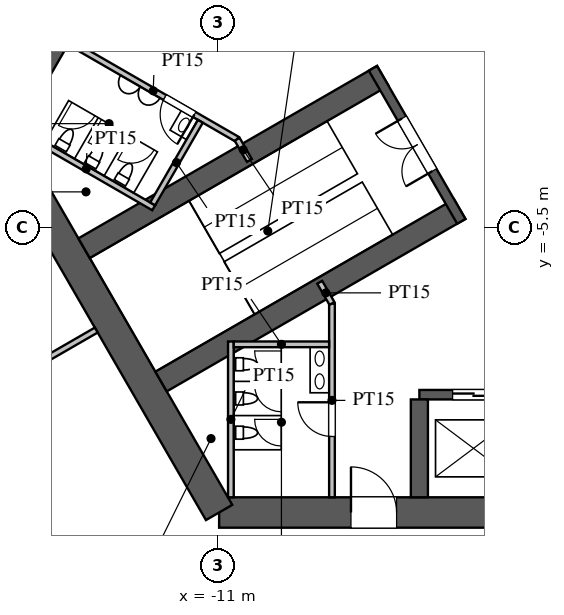
"""IFC4 building model, lengths in metres.
Left out: names, types, materials, properties, quantities, classifications, styles, units other than length and angle.
Written with IfcOpenShell. Run it as: python <this file> out.ifc"""

import sys

from ifc_helpers import new_model, si_unit, direction, frame, frame_2d, origin, place, context, subcontext, project, spatial, rectangle, extrude, element, fill, save


model = new_model("IFC4")
c1 = context("Model", 3, precision=1e-05, world=origin(), true_north=direction((0.0, 1.0)))
c2 = subcontext(c1, "Body", "Model", "MODEL_VIEW")
j1 = project(units=[si_unit("LENGTHUNIT", "METRE"), si_unit("PLANEANGLEUNIT", "RADIAN")], contexts=[c1])
p1 = place(None, origin())
s1 = spatial("IfcSite", under=j1, at=p1, CompositionType="ELEMENT")
p2 = place(p1, origin())
s2 = spatial("IfcBuilding", under=s1, at=p2, CompositionType="ELEMENT")
p3 = place(p2, frame((0.0, 0.0, 98.1)))
s3 = spatial("IfcBuildingStorey", under=s2, at=p3, CompositionType="ELEMENT", Elevation=98.1)
p4 = place(p3, frame((-10.97, -13.0, 0.0), z_axis=(0.0, 0.0, 1.0), x_axis=(1.0, 0.0, 0.0)))
e1 = element("IfcWall", 1, at=p4, inside=s3, PredefinedType="SHEAR", context=c2, shape_type="SweptSolid", body=[
    extrude(rectangle(XDim=21.939, YDim=0.8, at=frame_2d((10.97, 0.0))), origin(), (0.0, 0.0, 1.0), 5.0),
])
p5 = place(p4, frame((17.27, 0.0, 0.0)))
e2 = element("IfcOpeningElement", 2, at=p5, cuts=e1, PredefinedType="OPENING", context=c2, shape_type="SweptSolid", body=[
    extrude(rectangle(XDim=1.2, YDim=2.1, at=frame_2d((0.6, 1.05))), frame((0.0, 0.41, 0.0), z_axis=(0.0, -1.0, 0.0), x_axis=(1.0, 0.0, 0.0)), (0.0, 0.0, 1.0), 0.82),
])
p6 = place(p4, frame((3.47, 0.0, 0.0)))
e3 = element("IfcOpeningElement", 3, at=p6, cuts=e1, PredefinedType="OPENING", context=c2, shape_type="SweptSolid", body=[
    extrude(rectangle(XDim=1.2, YDim=2.1, at=frame_2d((0.6, 1.05))), frame((0.0, 0.41, 0.0), z_axis=(0.0, -1.0, 0.0), x_axis=(1.0, 0.0, 0.0)), (0.0, 0.0, 1.0), 0.82),
])
p7 = place(p3, frame((-5.773, 16.0, 0.0), z_axis=(0.0, 0.0, 1.0), x_axis=(-0.500002442456, -0.866023993627, 0.0)))
e4 = element("IfcWall", 4, at=p7, inside=s3, PredefinedType="SHEAR", context=c2, shape_type="SweptSolid", body=[
    extrude(rectangle(XDim=21.939, YDim=0.8, at=frame_2d((10.97, 0.0))), origin(), (0.0, 0.0, 1.0), 5.0),
])
p8 = place(p7, frame((17.27, 0.0, 0.0)))
e5 = element("IfcOpeningElement", 5, at=p8, cuts=e4, PredefinedType="OPENING", context=c2, shape_type="SweptSolid", body=[
    extrude(rectangle(XDim=1.2, YDim=2.1, at=frame_2d((0.6, 1.05))), frame((0.0, 0.41, 0.0), z_axis=(0.0, -1.0, 0.0), x_axis=(1.0, 0.0, 0.0)), (0.0, 0.0, 1.0), 0.82),
])
p9 = place(p7, frame((3.47, 0.0, 0.0)))
e6 = element("IfcOpeningElement", 6, at=p9, cuts=e4, PredefinedType="OPENING", context=c2, shape_type="SweptSolid", body=[
    extrude(rectangle(XDim=1.2, YDim=2.1, at=frame_2d((0.6, 1.05))), frame((0.0, 0.41, 0.0), z_axis=(0.0, -1.0, 0.0), x_axis=(1.0, 0.0, 0.0)), (0.0, 0.0, 1.0), 0.82),
])
p10 = place(p3, frame((-16.743, -3.0, 0.0), z_axis=(0.0, 0.0, 1.0), x_axis=(0.499995765644, -0.866027848477, 0.0)))
e7 = element("IfcWall", 7, at=p10, inside=s3, PredefinedType="SHEAR", context=c2, shape_type="SweptSolid", body=[
    extrude(rectangle(XDim=11.547, YDim=0.8, at=frame_2d((5.773, 0.0))), origin(), (0.0, 0.0, 1.0), 5.0),
])
p11 = place(p3, frame((-5.7, -9.9, 0.0), z_axis=(0.0, 0.0, 1.0), x_axis=(1.0, 0.0, 0.0)))
e8 = element("IfcWall", 8, at=p11, inside=s3, PredefinedType="SHEAR", context=c2, shape_type="SweptSolid", body=[
    extrude(rectangle(XDim=11.4, YDim=0.25, at=frame_2d((5.7, 0.0))), origin(), (0.0, 0.0, 1.0), 5.0),
])
p12 = place(p11, frame((0.875, 0.0, 0.0)))
e9 = element("IfcOpeningElement", 9, at=p12, cuts=e8, PredefinedType="OPENING", context=c2, shape_type="SweptSolid", body=[
    extrude(rectangle(XDim=1.1, YDim=2.2, at=frame_2d((0.55, 1.1))), frame((0.0, 0.135, 0.0), z_axis=(0.0, -1.0, 0.0), x_axis=(1.0, 0.0, 0.0)), (0.0, 0.0, 1.0), 0.27),
])
p13 = place(p11, frame((3.725, 0.0, 0.0)))
e10 = element("IfcOpeningElement", 10, at=p13, cuts=e8, PredefinedType="OPENING", context=c2, shape_type="SweptSolid", body=[
    extrude(rectangle(XDim=1.1, YDim=2.2, at=frame_2d((0.55, 1.1))), frame((0.0, 0.135, 0.0), z_axis=(0.0, -1.0, 0.0), x_axis=(1.0, 0.0, 0.0)), (0.0, 0.0, 1.0), 0.27),
])
p14 = place(p11, frame((6.575, 0.0, 0.0)))
e11 = element("IfcOpeningElement", 11, at=p14, cuts=e8, PredefinedType="OPENING", context=c2, shape_type="SweptSolid", body=[
    extrude(rectangle(XDim=1.1, YDim=2.2, at=frame_2d((0.55, 1.1))), frame((0.0, 0.135, 0.0), z_axis=(0.0, -1.0, 0.0), x_axis=(1.0, 0.0, 0.0)), (0.0, 0.0, 1.0), 0.27),
])
p15 = place(p11, frame((9.425, 0.0, 0.0)))
e12 = element("IfcOpeningElement", 12, at=p15, cuts=e8, PredefinedType="OPENING", context=c2, shape_type="SweptSolid", body=[
    extrude(rectangle(XDim=1.1, YDim=2.2, at=frame_2d((0.55, 1.1))), frame((0.0, 0.135, 0.0), z_axis=(0.0, -1.0, 0.0), x_axis=(1.0, 0.0, 0.0)), (0.0, 0.0, 1.0), 0.27),
])
p16 = place(p3, frame((-5.7, -10.025, 0.0), z_axis=(0.0, 0.0, 1.0), x_axis=(0.0, -1.0, 0.0)))
e13 = element("IfcWall", 13, at=p16, inside=s3, PredefinedType="SHEAR", context=c2, shape_type="SweptSolid", body=[
    extrude(rectangle(XDim=2.575, YDim=0.45, at=frame_2d((1.288, 0.0))), origin(), (0.0, 0.0, 1.0), 5.0),
])
for number, where, z_axis, x_axis in (
    (14, (-6.663, -1.509, 0.0), (0.0, 0.0, 1.0), (-0.866, -0.5, 0.0)),
    (15, (-4.638, -5.016, 0.0), (0.0, 0.0, 1.0), (-0.866, -0.5, 0.0)),
):
    element("IfcWall", number, at=place(p3, frame(where, z_axis=z_axis, x_axis=x_axis)), inside=s3, PredefinedType="SHEAR", context=c2, shape_type="SweptSolid", body=[
        extrude(rectangle(XDim=9.075, YDim=0.6, at=frame_2d((4.538, 0.0))), origin(), (0.0, 0.0, 1.0), 5.0),
    ])
p17 = place(p3, frame((-6.922, -1.312, 0.0), z_axis=(0.0, 0.0, 1.0), x_axis=(0.499984536904, -0.866034331223, 0.0)))
e16 = element("IfcWall", 16, at=p17, inside=s3, PredefinedType="SHEAR", context=c2, shape_type="SweptSolid", body=[
    extrude(rectangle(XDim=4.65, YDim=0.25, at=frame_2d((2.325, 0.0))), origin(), (0.0, 0.0, 1.0), 5.0),
])
p18 = place(p17, frame((1.525, 0.0, 0.0)))
e17 = element("IfcOpeningElement", 17, at=p18, cuts=e16, PredefinedType="OPENING", context=c2, shape_type="SweptSolid", body=[
    extrude(rectangle(XDim=1.6, YDim=2.1, at=frame_2d((0.8, 1.05))), frame((0.0, 0.135, 0.0), z_axis=(0.0, -1.0, 0.0), x_axis=(1.0, 0.0, 0.0)), (0.0, 0.0, 1.0), 0.27),
])
p19 = place(p3, frame((-8.0, -7.5, 0.0), z_axis=(0.0, 0.0, 1.0), x_axis=(0.0, -1.0, 0.0)))
e18 = element("IfcWall", 18, at=p19, inside=s3, PredefinedType="PARTITIONING", context=c2, shape_type="SweptSolid", body=[
    extrude(rectangle(XDim=5.1, YDim=0.15, at=frame_2d((2.55, 0.0))), origin(), (0.0, 0.0, 1.0), 4.8),
])
p20 = place(p19, frame((2.6, 0.0, 0.0)))
e19 = element("IfcOpeningElement", 19, at=p20, cuts=e18, PredefinedType="OPENING", context=c2, shape_type="SweptSolid", body=[
    extrude(rectangle(XDim=0.9, YDim=2.1, at=frame_2d((0.45, 1.05))), frame((0.0, 0.085, 0.0), z_axis=(0.0, -1.0, 0.0), x_axis=(1.0, 0.0, 0.0)), (0.0, 0.0, 1.0), 0.17),
])
p21 = place(p3, frame((-10.495, -3.178, 0.0), z_axis=(0.0, 0.0, 1.0), x_axis=(-0.86602216432, 0.500005610874, 0.0)))
e20 = element("IfcWall", 20, at=p21, inside=s3, PredefinedType="PARTITIONING", context=c2, shape_type="SweptSolid", body=[
    extrude(rectangle(XDim=5.1, YDim=0.15, at=frame_2d((2.55, 0.0))), origin(), (0.0, 0.0, 1.0), 4.8),
])
p22 = place(p21, frame((1.3, 0.0, 0.0)))
e21 = element("IfcOpeningElement", 21, at=p22, cuts=e20, PredefinedType="OPENING", context=c2, shape_type="SweptSolid", body=[
    extrude(rectangle(XDim=0.9, YDim=2.1, at=frame_2d((0.45, 1.05))), frame((0.0, 0.085, 0.0), z_axis=(0.0, -1.0, 0.0), x_axis=(1.0, 0.0, 0.0)), (0.0, 0.0, 1.0), 0.17),
])
for number, where, z_axis, x_axis in (
    (22, (-10.495, -3.178, 0.0), (0.0, 0.0, 1.0), (0.5, -0.866, 0.0)),
    (23, (-8.0, -7.5, 0.0), (0.0, 0.0, 1.0), (-0.5, 0.866, 0.0)),
):
    element("IfcWall", number, at=place(p3, frame(where, z_axis=z_axis, x_axis=x_axis)), inside=s3, PredefinedType="PARTITIONING", context=c2, shape_type="SweptSolid", body=[
        extrude(rectangle(XDim=0.645, YDim=0.15, at=frame_2d((0.323, 0.0))), origin(), (0.0, 0.0, 1.0), 4.8),
    ])
p23 = place(p3, frame((-12.691, -4.982, 0.0), z_axis=(0.0, 0.0, 1.0), x_axis=(-0.8660249478, 0.500000789788, 0.0)))
e24 = element("IfcWall", 24, at=p23, inside=s3, PredefinedType="PARTITIONING", context=c2, shape_type="SweptSolid", body=[
    extrude(rectangle(XDim=4.1, YDim=0.15, at=frame_2d((2.05, 0.0))), origin(), (0.0, 0.0, 1.0), 4.8),
])
p24 = place(p3, frame((-11.464, -2.706, 0.0), z_axis=(0.0, 0.0, 1.0), x_axis=(-0.50001992892, -0.866013897511, 0.0)))
e25 = element("IfcWall", 25, at=p24, inside=s3, PredefinedType="PARTITIONING", context=c2, shape_type="SweptSolid", body=[
    extrude(rectangle(XDim=2.51, YDim=0.15, at=frame_2d((1.255, 0.0))), origin(), (0.0, 0.0, 1.0), 4.8),
])
p25 = place(p3, frame((-10.66, -8.5, 0.0), z_axis=(0.0, 0.0, 1.0), x_axis=(0.0, -1.0, 0.0)))
e26 = element("IfcWall", 26, at=p25, inside=s3, PredefinedType="PARTITIONING", context=c2, shape_type="SweptSolid", body=[
    extrude(rectangle(XDim=4.1, YDim=0.15, at=frame_2d((2.05, 0.0))), origin(), (0.0, 0.0, 1.0), 4.8),
])
p26 = place(p3, frame((-8.075, -8.575, 0.0), z_axis=(0.0, 0.0, 1.0), x_axis=(-1.0, 0.0, 0.0)))
e27 = element("IfcWall", 27, at=p26, inside=s3, PredefinedType="PARTITIONING", context=c2, shape_type="SweptSolid", body=[
    extrude(rectangle(XDim=2.51, YDim=0.15, at=frame_2d((1.255, 0.0))), origin(), (0.0, 0.0, 1.0), 4.8),
])
p27 = place(p3, frame((-14.203, -8.2, 0.0), z_axis=(0.0, 0.0, 1.0), x_axis=(-0.866024668836, -0.500001272966, 0.0)))
e28 = element("IfcWall", 28, at=p27, inside=s3, PredefinedType="PARTITIONING", context=c2, shape_type="SweptSolid", body=[
    extrude(rectangle(XDim=16.65, YDim=0.15, at=frame_2d((8.325, 0.0))), origin(), (0.0, 0.0, 1.0), 3.1),
])
p28 = place(p20, frame((0.9, 0.0, 0.0), z_axis=(0.0, 0.0, 1.0), x_axis=(-1.0, 0.0, 0.0)))
e29 = element("IfcDoor", 29, at=p28, inside=s3, OperationType="SINGLE_SWING_RIGHT", PredefinedType="DOOR", context=c2, shape_type="SweptSolid", body=[
    extrude(rectangle(XDim=0.9, YDim=2.1, at=frame_2d((0.45, 1.05))), frame((0.0, 0.025, 0.0), z_axis=(0.0, -1.0, 0.0), x_axis=(1.0, 0.0, 0.0)), (0.0, 0.0, 1.0), 0.05),
])
fill(e19, e29)
p29 = place(p22, origin())
e30 = element("IfcDoor", 30, at=p29, inside=s3, OperationType="SINGLE_SWING_LEFT", PredefinedType="DOOR", context=c2, shape_type="SweptSolid", body=[
    extrude(rectangle(XDim=0.9, YDim=2.1, at=frame_2d((0.45, 1.05))), frame((0.0, 0.025, 0.0), z_axis=(0.0, -1.0, 0.0), x_axis=(1.0, 0.0, 0.0)), (0.0, 0.0, 1.0), 0.05),
])
fill(e21, e30)
p30 = place(p18, frame((1.6, 0.0, 0.0), z_axis=(0.0, 0.0, 1.0), x_axis=(-1.0, 0.0, 0.0)))
e31 = element("IfcDoor", 31, at=p30, inside=s3, OperationType="DOUBLE_DOOR_SINGLE_SWING", PredefinedType="DOOR", context=c2, shape_type="SweptSolid", body=[
    extrude(rectangle(XDim=1.6, YDim=2.1, at=frame_2d((0.8, 1.05))), frame((0.0, 0.025, 0.0), z_axis=(0.0, -1.0, 0.0), x_axis=(1.0, 0.0, 0.0)), (0.0, 0.0, 1.0), 0.05),
])
fill(e17, e31)
p31 = place(p6, origin())
e32 = element("IfcDoor", 32, at=p31, inside=s3, OperationType="SINGLE_SWING_LEFT", PredefinedType="DOOR", context=c2, shape_type="SweptSolid", body=[
    extrude(rectangle(XDim=1.2, YDim=2.1, at=frame_2d((0.6, 1.05))), frame((0.0, 0.025, 0.0), z_axis=(0.0, -1.0, 0.0), x_axis=(1.0, 0.0, 0.0)), (0.0, 0.0, 1.0), 0.05),
])
fill(e3, e32)
p32 = place(p12, origin())
e33 = element("IfcDoor", 33, at=p32, inside=s3, OperationType="DOUBLE_DOOR_SLIDING", PredefinedType="DOOR", context=c2, shape_type="SweptSolid", body=[
    extrude(rectangle(XDim=1.1, YDim=2.2, at=frame_2d((0.55, 1.1))), frame((0.0, 0.025, 0.0), z_axis=(0.0, -1.0, 0.0), x_axis=(1.0, 0.0, 0.0)), (0.0, 0.0, 1.0), 0.05),
])
fill(e9, e33)
save(model, sys.argv[1])
